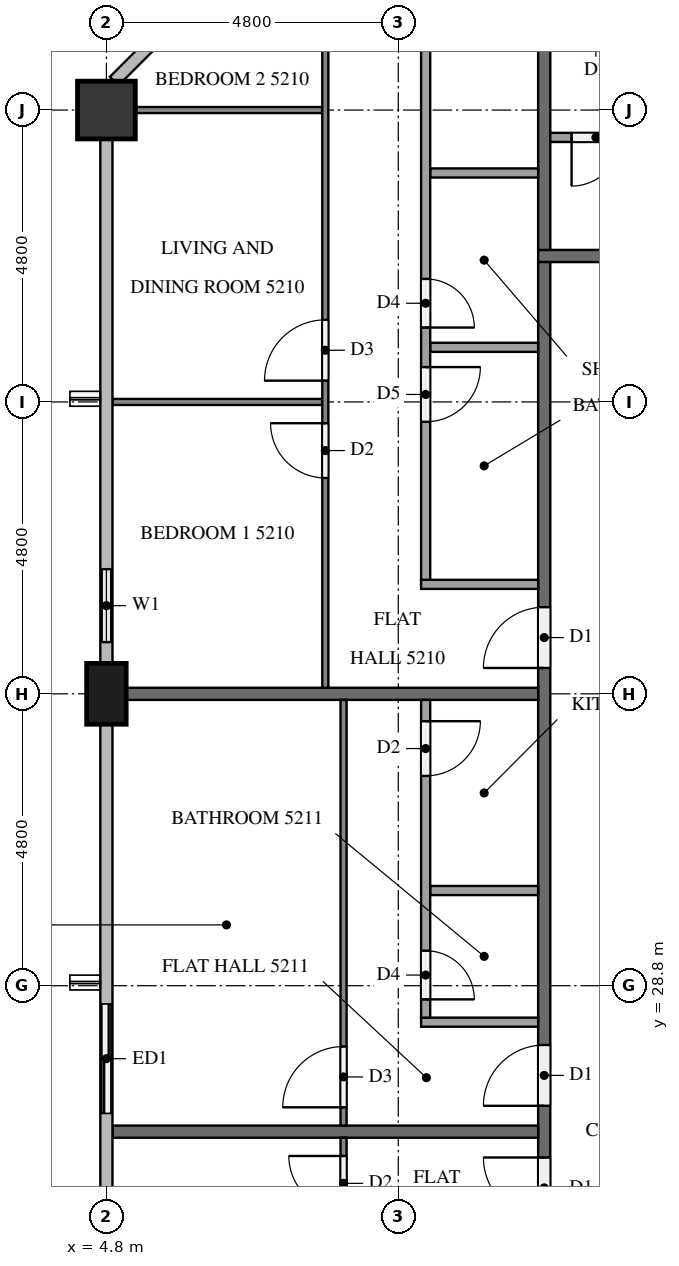
"""IFC4 building model, lengths in metres.
Left out: names, types, materials, properties, quantities, classifications, styles, units other than length and angle.
Written with IfcOpenShell. Run it as: python <this file> out.ifc"""

import sys

from ifc_helpers import new_model, si_unit, direction, frame, frame_2d, origin, origin_2d, place, context, subcontext, project, spatial, rectangle, extrude, element, fill, save


model = new_model("IFC4")
c1 = context("Model", 3, precision=1e-05, world=origin(), true_north=direction((0.0, 1.0)))
c2 = subcontext(c1, "Body", "Model", "MODEL_VIEW")
j1 = project(units=[si_unit("LENGTHUNIT", "METRE"), si_unit("PLANEANGLEUNIT", "RADIAN")], contexts=[c1])
p1 = place(None, origin())
s1 = spatial("IfcSite", under=j1, at=p1, CompositionType="ELEMENT")
p2 = place(p1, origin())
s2 = spatial("IfcBuilding", under=s1, at=p2, CompositionType="ELEMENT")
p3 = place(p2, frame((0.0, 0.0, 199.9)))
s3 = spatial("IfcBuildingStorey", under=s2, at=p3, CompositionType="ELEMENT", Elevation=199.9)
p4 = place(p3, frame((4.8, 43.2, 0.0), z_axis=(0.0, 0.0, 1.0), x_axis=(1.0, 0.0, 0.0)))
e1 = element("IfcColumn", 1, at=p4, inside=s3, PredefinedType="COLUMN", context=c2, shape_type="SweptSolid", body=[
    extrude(rectangle(XDim=0.95, YDim=0.95, at=origin_2d()), origin(), (0.0, 0.0, 1.0), 3.1),
])
p5 = place(p3, frame((4.8, 33.6, 0.0), z_axis=(0.0, 0.0, 1.0), x_axis=(0.0, 1.0, 0.0)))
e2 = element("IfcColumn", 2, at=p5, inside=s3, PredefinedType="COLUMN", context=c2, shape_type="SweptSolid", body=[
    extrude(rectangle(XDim=1.0, YDim=0.65, at=origin_2d()), origin(), (0.0, 0.0, 1.0), 3.1),
])
p6 = place(p3, frame((4.8, 36.0, 0.0), z_axis=(0.0, 0.0, 1.0), x_axis=(0.0, -1.0, 0.0)))
e3 = element("IfcWall", 3, at=p6, inside=s3, PredefinedType="SOLIDWALL", context=c2, shape_type="SweptSolid", body=[
    extrude(rectangle(XDim=1.9, YDim=0.15, at=frame_2d((0.95, 0.0))), origin(), (0.0, 0.0, 1.0), 3.1),
])
p7 = place(p6, frame((0.35, 0.0, 0.9)))
e4 = element("IfcOpeningElement", 4, at=p7, cuts=e3, PredefinedType="OPENING", context=c2, shape_type="SweptSolid", body=[
    extrude(rectangle(XDim=1.2, YDim=1.4, at=frame_2d((0.6, 0.7))), frame((0.0, 0.085, 0.0), z_axis=(0.0, -1.0, 0.0), x_axis=(1.0, 0.0, 0.0)), (0.0, 0.0, 1.0), 0.17),
])
p8 = place(p3, frame((4.8, 28.8, 0.0), z_axis=(0.0, 0.0, 1.0), x_axis=(0.0, -1.0, 0.0)))
e5 = element("IfcWall", 5, at=p8, inside=s3, PredefinedType="SOLIDWALL", context=c2, shape_type="SweptSolid", body=[
    extrude(rectangle(XDim=2.4, YDim=0.15, at=frame_2d((1.2, 0.0))), origin(), (0.0, 0.0, 1.0), 3.1),
])
p9 = place(p8, frame((0.3, 0.0, 0.0)))
e6 = element("IfcOpeningElement", 6, at=p9, cuts=e5, PredefinedType="OPENING", context=c2, shape_type="SweptSolid", body=[
    extrude(rectangle(XDim=1.8, YDim=2.4, at=frame_2d((0.9, 1.2))), frame((0.0, 0.085, 0.0), z_axis=(0.0, -1.0, 0.0), x_axis=(1.0, 0.0, 0.0)), (0.0, 0.0, 1.0), 0.17),
])
p10 = place(p3, frame((11.9, 40.8, 0.0), z_axis=(0.0, 0.0, 1.0), x_axis=(1.0, 0.0, 0.0)))
e7 = element("IfcWall", 7, at=p10, inside=s3, PredefinedType="PARTITIONING", context=c2, shape_type="SweptSolid", body=[
    extrude(rectangle(XDim=38.6, YDim=0.2, at=frame_2d((19.3, 0.0))), origin(), (0.0, 0.0, 1.0), 3.1),
])
p11 = place(p10, frame((37.025, 0.0, 0.0)))
e8 = element("IfcOpeningElement", 8, at=p11, cuts=e7, PredefinedType="OPENING", context=c2, shape_type="SweptSolid", body=[
    extrude(rectangle(XDim=1.1, YDim=2.1, at=frame_2d((0.55, 1.05))), frame((0.0, 0.11, 0.0), z_axis=(0.0, -1.0, 0.0), x_axis=(1.0, 0.0, 0.0)), (0.0, 0.0, 1.0), 0.22),
])
p12 = place(p10, frame((17.825, 0.0, 0.0)))
e9 = element("IfcOpeningElement", 9, at=p12, cuts=e7, PredefinedType="OPENING", context=c2, shape_type="SweptSolid", body=[
    extrude(rectangle(XDim=1.1, YDim=2.1, at=frame_2d((0.55, 1.05))), frame((0.0, 0.11, 0.0), z_axis=(0.0, -1.0, 0.0), x_axis=(1.0, 0.0, 0.0)), (0.0, 0.0, 1.0), 0.22),
])
p13 = place(p3, frame((12.0, 12.1, 0.0), z_axis=(0.0, 0.0, 1.0), x_axis=(0.0, 1.0, 0.0)))
e10 = element("IfcWall", 10, at=p13, inside=s3, PredefinedType="PARTITIONING", context=c2, shape_type="SweptSolid", body=[
    extrude(rectangle(XDim=28.6, YDim=0.2, at=frame_2d((14.3, 0.0))), origin(), (0.0, 0.0, 1.0), 3.1),
])
p14 = place(p13, frame((21.925, 0.0, 0.0)))
e11 = element("IfcOpeningElement", 11, at=p14, cuts=e10, PredefinedType="OPENING", context=c2, shape_type="SweptSolid", body=[
    extrude(rectangle(XDim=1.0, YDim=2.1, at=frame_2d((0.5, 1.05))), frame((0.0, 0.11, 0.0), z_axis=(0.0, -1.0, 0.0), x_axis=(1.0, 0.0, 0.0)), (0.0, 0.0, 1.0), 0.22),
])
p15 = place(p13, frame((14.725, 0.0, 0.0)))
e12 = element("IfcOpeningElement", 12, at=p15, cuts=e10, PredefinedType="OPENING", context=c2, shape_type="SweptSolid", body=[
    extrude(rectangle(XDim=1.0, YDim=2.1, at=frame_2d((0.5, 1.05))), frame((0.0, 0.11, 0.0), z_axis=(0.0, -1.0, 0.0), x_axis=(1.0, 0.0, 0.0)), (0.0, 0.0, 1.0), 0.22),
])
p16 = place(p13, frame((12.875, 0.0, 0.0)))
e13 = element("IfcOpeningElement", 13, at=p16, cuts=e10, PredefinedType="OPENING", context=c2, shape_type="SweptSolid", body=[
    extrude(rectangle(XDim=1.0, YDim=2.1, at=frame_2d((0.5, 1.05))), frame((0.0, 0.11, 0.0), z_axis=(0.0, -1.0, 0.0), x_axis=(1.0, 0.0, 0.0)), (0.0, 0.0, 1.0), 0.22),
])
p17 = place(p3, frame((12.0, 47.9, 0.0), z_axis=(0.0, 0.0, 1.0), x_axis=(0.0, -1.0, 0.0)))
e14 = element("IfcWall", 14, at=p17, inside=s3, PredefinedType="PARTITIONING", context=c2, shape_type="SweptSolid", body=[
    extrude(rectangle(XDim=7.0, YDim=0.2, at=frame_2d((3.5, 0.0))), origin(), (0.0, 0.0, 1.0), 3.1),
])
p18 = place(p3, frame((5.125, 33.6, 0.0), z_axis=(0.0, 0.0, 1.0), x_axis=(1.0, 0.0, 0.0)))
e15 = element("IfcWall", 15, at=p18, inside=s3, PredefinedType="PARTITIONING", context=c2, shape_type="SweptSolid", body=[
    extrude(rectangle(XDim=6.775, YDim=0.2, at=frame_2d((3.387, 0.0))), origin(), (0.0, 0.0, 1.0), 3.1),
])
p19 = place(p3, frame((4.9, 26.4, 0.0), z_axis=(0.0, 0.0, 1.0), x_axis=(1.0, 0.0, 0.0)))
e16 = element("IfcWall", 16, at=p19, inside=s3, PredefinedType="PARTITIONING", context=c2, shape_type="SweptSolid", body=[
    extrude(rectangle(XDim=7.0, YDim=0.2, at=frame_2d((3.5, 0.0))), origin(), (0.0, 0.0, 1.0), 3.1),
])
p20 = place(p3, frame((29.325, 42.75, 0.0), z_axis=(0.0, 0.0, 1.0), x_axis=(-1.0, 0.0, 0.0)))
e17 = element("IfcWall", 17, at=p20, inside=s3, PredefinedType="PARTITIONING", context=c2, shape_type="SweptSolid", body=[
    extrude(rectangle(XDim=17.225, YDim=0.15, at=frame_2d((8.612, 0.0))), origin(), (0.0, 0.0, 1.0), 3.1),
])
p21 = place(p20, frame((0.3, 0.0, 0.0)))
e18 = element("IfcOpeningElement", 18, at=p21, cuts=e17, PredefinedType="OPENING", context=c2, shape_type="SweptSolid", body=[
    extrude(rectangle(XDim=0.9, YDim=2.1, at=frame_2d((0.45, 1.05))), frame((0.0, 0.085, 0.0), z_axis=(0.0, -1.0, 0.0), x_axis=(1.0, 0.0, 0.0)), (0.0, 0.0, 1.0), 0.17),
])
p22 = place(p20, frame((9.541, 0.0, 0.0)))
e19 = element("IfcOpeningElement", 19, at=p22, cuts=e17, PredefinedType="OPENING", context=c2, shape_type="SweptSolid", body=[
    extrude(rectangle(XDim=0.9, YDim=2.1, at=frame_2d((0.45, 1.05))), frame((0.0, 0.085, 0.0), z_axis=(0.0, -1.0, 0.0), x_axis=(1.0, 0.0, 0.0)), (0.0, 0.0, 1.0), 0.17),
])
p23 = place(p20, frame((11.091, 0.0, 0.0)))
e20 = element("IfcOpeningElement", 20, at=p23, cuts=e17, PredefinedType="OPENING", context=c2, shape_type="SweptSolid", body=[
    extrude(rectangle(XDim=0.8, YDim=2.1, at=frame_2d((0.4, 1.05))), frame((0.0, 0.085, 0.0), z_axis=(0.0, -1.0, 0.0), x_axis=(1.0, 0.0, 0.0)), (0.0, 0.0, 1.0), 0.17),
])
p24 = place(p20, frame((16.075, 0.0, 0.0)))
e21 = element("IfcOpeningElement", 21, at=p24, cuts=e17, PredefinedType="OPENING", context=c2, shape_type="SweptSolid", body=[
    extrude(rectangle(XDim=0.8, YDim=2.1, at=frame_2d((0.4, 1.05))), frame((0.0, 0.085, 0.0), z_axis=(0.0, -1.0, 0.0), x_axis=(1.0, 0.0, 0.0)), (0.0, 0.0, 1.0), 0.17),
])
p25 = place(p3, frame((8.35, 38.4, 0.0), z_axis=(0.0, 0.0, 1.0), x_axis=(-1.0, 0.0, 0.0)))
e22 = element("IfcWall", 22, at=p25, inside=s3, PredefinedType="PARTITIONING", context=c2, shape_type="SweptSolid", body=[
    extrude(rectangle(XDim=3.45, YDim=0.1, at=frame_2d((1.725, 0.0))), origin(), (0.0, 0.0, 1.0), 3.1),
])
p26 = place(p3, frame((8.35, 43.2, 0.0), z_axis=(0.0, 0.0, 1.0), x_axis=(-1.0, 0.0, 0.0)))
e23 = element("IfcWall", 23, at=p26, inside=s3, PredefinedType="PARTITIONING", context=c2, shape_type="SweptSolid", body=[
    extrude(rectangle(XDim=3.075, YDim=0.1, at=frame_2d((1.538, 0.0))), origin(), (0.0, 0.0, 1.0), 3.1),
])
p27 = place(p3, frame((8.4, 33.7, 0.0), z_axis=(0.0, 0.0, 1.0), x_axis=(0.0, 1.0, 0.0)))
e24 = element("IfcWall", 24, at=p27, inside=s3, PredefinedType="PARTITIONING", context=c2, shape_type="SweptSolid", body=[
    extrude(rectangle(XDim=13.879, YDim=0.1, at=frame_2d((6.939, 0.0))), origin(), (0.0, 0.0, 1.0), 3.1),
])
p28 = place(p27, frame((3.45, 0.0, 0.0)))
e25 = element("IfcOpeningElement", 25, at=p28, cuts=e24, PredefinedType="OPENING", context=c2, shape_type="SweptSolid", body=[
    extrude(rectangle(XDim=0.9, YDim=2.1, at=frame_2d((0.45, 1.05))), frame((0.0, 0.06, 0.0), z_axis=(0.0, -1.0, 0.0), x_axis=(1.0, 0.0, 0.0)), (0.0, 0.0, 1.0), 0.12),
])
p29 = place(p27, frame((5.05, 0.0, 0.0)))
e26 = element("IfcOpeningElement", 26, at=p29, cuts=e24, PredefinedType="OPENING", context=c2, shape_type="SweptSolid", body=[
    extrude(rectangle(XDim=1.0, YDim=2.1, at=frame_2d((0.5, 1.05))), frame((0.0, 0.06, 0.0), z_axis=(0.0, -1.0, 0.0), x_axis=(1.0, 0.0, 0.0)), (0.0, 0.0, 1.0), 0.12),
])
p30 = place(p27, frame((12.678, 0.0, 0.0)))
e27 = element("IfcOpeningElement", 27, at=p30, cuts=e24, PredefinedType="OPENING", context=c2, shape_type="SweptSolid", body=[
    extrude(rectangle(XDim=0.9, YDim=2.1, at=frame_2d((0.45, 1.05))), frame((0.0, 0.06, 0.0), z_axis=(0.0, -1.0, 0.0), x_axis=(1.0, 0.0, 0.0)), (0.0, 0.0, 1.0), 0.12),
])
for number, where, z_axis, x_axis in (
    (28, (11.9, 39.298, 0.0), (0.0, 0.0, 1.0), (-1.0, 0.0, 0.0)),
    (29, (11.9, 42.165, 0.0), (0.0, 0.0, 1.0), (-1.0, 0.0, 0.0)),
):
    element("IfcWall", number, at=place(p3, frame(where, z_axis=z_axis, x_axis=x_axis)), inside=s3, PredefinedType="PARTITIONING", context=c2, shape_type="SweptSolid", body=[
        extrude(rectangle(XDim=1.775, YDim=0.15, at=frame_2d((0.887, 0.0))), origin(), (0.0, 0.0, 1.0), 3.1),
    ])
p31 = place(p3, frame((11.9, 35.4, 0.0), z_axis=(0.0, 0.0, 1.0), x_axis=(-1.0, 0.0, 0.0)))
e30 = element("IfcWall", 30, at=p31, inside=s3, PredefinedType="PARTITIONING", context=c2, shape_type="SweptSolid", body=[
    extrude(rectangle(XDim=1.925, YDim=0.15, at=frame_2d((0.962, 0.0))), origin(), (0.0, 0.0, 1.0), 3.1),
])
p32 = place(p3, frame((10.05, 47.525, 0.0), z_axis=(0.0, 0.0, 1.0), x_axis=(0.0, -1.0, 0.0)))
e31 = element("IfcWall", 31, at=p32, inside=s3, PredefinedType="PARTITIONING", context=c2, shape_type="SweptSolid", body=[
    extrude(rectangle(XDim=12.05, YDim=0.15, at=frame_2d((6.025, 0.0))), origin(), (0.0, 0.0, 1.0), 3.1),
])
p33 = place(p32, frame((8.552, 0.0, 0.0)))
e32 = element("IfcOpeningElement", 32, at=p33, cuts=e31, PredefinedType="OPENING", context=c2, shape_type="SweptSolid", body=[
    extrude(rectangle(XDim=0.9, YDim=2.1, at=frame_2d((0.45, 1.05))), frame((0.0, 0.085, 0.0), z_axis=(0.0, -1.0, 0.0), x_axis=(1.0, 0.0, 0.0)), (0.0, 0.0, 1.0), 0.17),
])
p34 = place(p32, frame((7.102, 0.0, 0.0)))
e33 = element("IfcOpeningElement", 33, at=p34, cuts=e31, PredefinedType="OPENING", context=c2, shape_type="SweptSolid", body=[
    extrude(rectangle(XDim=0.8, YDim=2.1, at=frame_2d((0.4, 1.05))), frame((0.0, 0.085, 0.0), z_axis=(0.0, -1.0, 0.0), x_axis=(1.0, 0.0, 0.0)), (0.0, 0.0, 1.0), 0.17),
])
p35 = place(p32, frame((0.3, 0.0, 0.0)))
e34 = element("IfcOpeningElement", 34, at=p35, cuts=e31, PredefinedType="OPENING", context=c2, shape_type="SweptSolid", body=[
    extrude(rectangle(XDim=0.9, YDim=2.1, at=frame_2d((0.45, 1.05))), frame((0.0, 0.085, 0.0), z_axis=(0.0, -1.0, 0.0), x_axis=(1.0, 0.0, 0.0)), (0.0, 0.0, 1.0), 0.17),
])
p36 = place(p3, frame((8.7, 26.5, 0.0), z_axis=(0.0, 0.0, 1.0), x_axis=(0.0, 1.0, 0.0)))
e35 = element("IfcWall", 35, at=p36, inside=s3, PredefinedType="PARTITIONING", context=c2, shape_type="SweptSolid", body=[
    extrude(rectangle(XDim=7.0, YDim=0.1, at=frame_2d((3.5, 0.0))), origin(), (0.0, 0.0, 1.0), 3.1),
])
p37 = place(p36, frame((0.3, 0.0, 0.0)))
e36 = element("IfcOpeningElement", 36, at=p37, cuts=e35, PredefinedType="OPENING", context=c2, shape_type="SweptSolid", body=[
    extrude(rectangle(XDim=1.0, YDim=2.1, at=frame_2d((0.5, 1.05))), frame((0.0, 0.06, 0.0), z_axis=(0.0, -1.0, 0.0), x_axis=(1.0, 0.0, 0.0)), (0.0, 0.0, 1.0), 0.12),
])
p38 = place(p3, frame((11.9, 30.365, 0.0), z_axis=(0.0, 0.0, 1.0), x_axis=(-1.0, 0.0, 0.0)))
e37 = element("IfcWall", 37, at=p38, inside=s3, PredefinedType="PARTITIONING", context=c2, shape_type="SweptSolid", body=[
    extrude(rectangle(XDim=1.775, YDim=0.15, at=frame_2d((0.887, 0.0))), origin(), (0.0, 0.0, 1.0), 3.1),
])
p39 = place(p3, frame((11.9, 28.2, 0.0), z_axis=(0.0, 0.0, 1.0), x_axis=(-1.0, 0.0, 0.0)))
e38 = element("IfcWall", 38, at=p39, inside=s3, PredefinedType="PARTITIONING", context=c2, shape_type="SweptSolid", body=[
    extrude(rectangle(XDim=1.925, YDim=0.15, at=frame_2d((0.962, 0.0))), origin(), (0.0, 0.0, 1.0), 3.1),
])
p40 = place(p3, frame((10.05, 33.5, 0.0), z_axis=(0.0, 0.0, 1.0), x_axis=(0.0, -1.0, 0.0)))
e39 = element("IfcWall", 39, at=p40, inside=s3, PredefinedType="PARTITIONING", context=c2, shape_type="SweptSolid", body=[
    extrude(rectangle(XDim=5.225, YDim=0.15, at=frame_2d((2.613, 0.0))), origin(), (0.0, 0.0, 1.0), 3.1),
])
p41 = place(p40, frame((4.125, 0.0, 0.0)))
e40 = element("IfcOpeningElement", 40, at=p41, cuts=e39, PredefinedType="OPENING", context=c2, shape_type="SweptSolid", body=[
    extrude(rectangle(XDim=0.8, YDim=2.1, at=frame_2d((0.4, 1.05))), frame((0.0, 0.085, 0.0), z_axis=(0.0, -1.0, 0.0), x_axis=(1.0, 0.0, 0.0)), (0.0, 0.0, 1.0), 0.17),
])
p42 = place(p40, frame((0.35, 0.0, 0.0)))
e41 = element("IfcOpeningElement", 41, at=p42, cuts=e39, PredefinedType="OPENING", context=c2, shape_type="SweptSolid", body=[
    extrude(rectangle(XDim=0.9, YDim=2.1, at=frame_2d((0.45, 1.05))), frame((0.0, 0.085, 0.0), z_axis=(0.0, -1.0, 0.0), x_axis=(1.0, 0.0, 0.0)), (0.0, 0.0, 1.0), 0.17),
])
p43 = place(p3, frame((8.7, 12.1, 0.0), z_axis=(0.0, 0.0, 1.0), x_axis=(0.0, 1.0, 0.0)))
e42 = element("IfcWall", 42, at=p43, inside=s3, PredefinedType="PARTITIONING", context=c2, shape_type="SweptSolid", body=[
    extrude(rectangle(XDim=14.2, YDim=0.1, at=frame_2d((7.1, 0.0))), origin(), (0.0, 0.0, 1.0), 3.1),
])
p44 = place(p43, frame((13.0, 0.0, 0.0)))
e43 = element("IfcOpeningElement", 43, at=p44, cuts=e42, PredefinedType="OPENING", context=c2, shape_type="SweptSolid", body=[
    extrude(rectangle(XDim=0.9, YDim=2.1, at=frame_2d((0.45, 1.05))), frame((0.0, 0.06, 0.0), z_axis=(0.0, -1.0, 0.0), x_axis=(1.0, 0.0, 0.0)), (0.0, 0.0, 1.0), 0.12),
])
p45 = place(p43, frame((5.05, 0.0, 0.0)))
e44 = element("IfcOpeningElement", 44, at=p45, cuts=e42, PredefinedType="OPENING", context=c2, shape_type="SweptSolid", body=[
    extrude(rectangle(XDim=1.0, YDim=2.1, at=frame_2d((0.5, 1.05))), frame((0.0, 0.06, 0.0), z_axis=(0.0, -1.0, 0.0), x_axis=(1.0, 0.0, 0.0)), (0.0, 0.0, 1.0), 0.12),
])
p46 = place(p43, frame((3.45, 0.0, 0.0)))
e45 = element("IfcOpeningElement", 45, at=p46, cuts=e42, PredefinedType="OPENING", context=c2, shape_type="SweptSolid", body=[
    extrude(rectangle(XDim=0.9, YDim=2.1, at=frame_2d((0.45, 1.05))), frame((0.0, 0.06, 0.0), z_axis=(0.0, -1.0, 0.0), x_axis=(1.0, 0.0, 0.0)), (0.0, 0.0, 1.0), 0.12),
])
p47 = place(p7, origin())
e46 = element("IfcWindow", 46, at=p47, inside=s3, PartitioningType="SINGLE_PANEL", PredefinedType="WINDOW", context=c2, shape_type="SweptSolid", body=[
    extrude(rectangle(XDim=1.2, YDim=1.4, at=frame_2d((0.6, 0.7))), frame((0.0, 0.03, 0.0), z_axis=(0.0, -1.0, 0.0), x_axis=(1.0, 0.0, 0.0)), (0.0, 0.0, 1.0), 0.06),
])
fill(e4, e46)
p48 = place(p9, origin())
e47 = element("IfcDoor", 47, at=p48, inside=s3, OperationType="SLIDING_TO_LEFT", PredefinedType="DOOR", context=c2, shape_type="SweptSolid", body=[
    extrude(rectangle(XDim=1.8, YDim=2.4, at=frame_2d((0.9, 1.2))), frame((0.0, 0.025, 0.0), z_axis=(0.0, -1.0, 0.0), x_axis=(1.0, 0.0, 0.0)), (0.0, 0.0, 1.0), 0.05),
])
fill(e6, e47)
p49 = place(p14, origin())
e48 = element("IfcDoor", 48, at=p49, inside=s3, OperationType="SINGLE_SWING_LEFT", PredefinedType="DOOR", context=c2, shape_type="SweptSolid", body=[
    extrude(rectangle(XDim=1.0, YDim=2.1, at=frame_2d((0.5, 1.05))), frame((0.0, 0.025, 0.0), z_axis=(0.0, -1.0, 0.0), x_axis=(1.0, 0.0, 0.0)), (0.0, 0.0, 1.0), 0.05),
])
fill(e11, e48)
p50 = place(p15, origin())
e49 = element("IfcDoor", 49, at=p50, inside=s3, OperationType="SINGLE_SWING_LEFT", PredefinedType="DOOR", context=c2, shape_type="SweptSolid", body=[
    extrude(rectangle(XDim=1.0, YDim=2.1, at=frame_2d((0.5, 1.05))), frame((0.0, 0.025, 0.0), z_axis=(0.0, -1.0, 0.0), x_axis=(1.0, 0.0, 0.0)), (0.0, 0.0, 1.0), 0.05),
])
fill(e12, e49)
p51 = place(p16, origin())
e50 = element("IfcDoor", 50, at=p51, inside=s3, OperationType="SINGLE_SWING_RIGHT", PredefinedType="DOOR", context=c2, shape_type="SweptSolid", body=[
    extrude(rectangle(XDim=1.0, YDim=2.1, at=frame_2d((0.5, 1.05))), frame((0.0, 0.025, 0.0), z_axis=(0.0, -1.0, 0.0), x_axis=(1.0, 0.0, 0.0)), (0.0, 0.0, 1.0), 0.05),
])
fill(e13, e50)
p52 = place(p24, origin())
e51 = element("IfcDoor", 51, at=p52, inside=s3, OperationType="SINGLE_SWING_RIGHT", PredefinedType="DOOR", context=c2, shape_type="SweptSolid", body=[
    extrude(rectangle(XDim=0.8, YDim=2.1, at=frame_2d((0.4, 1.05))), frame((0.0, 0.025, 0.0), z_axis=(0.0, -1.0, 0.0), x_axis=(1.0, 0.0, 0.0)), (0.0, 0.0, 1.0), 0.05),
])
fill(e21, e51)
p53 = place(p28, origin())
e52 = element("IfcDoor", 52, at=p53, inside=s3, OperationType="SINGLE_SWING_RIGHT", PredefinedType="DOOR", context=c2, shape_type="SweptSolid", body=[
    extrude(rectangle(XDim=0.9, YDim=2.1, at=frame_2d((0.45, 1.05))), frame((0.0, 0.025, 0.0), z_axis=(0.0, -1.0, 0.0), x_axis=(1.0, 0.0, 0.0)), (0.0, 0.0, 1.0), 0.05),
])
fill(e25, e52)
p54 = place(p29, origin())
e53 = element("IfcDoor", 53, at=p54, inside=s3, OperationType="SINGLE_SWING_LEFT", PredefinedType="DOOR", context=c2, shape_type="SweptSolid", body=[
    extrude(rectangle(XDim=1.0, YDim=2.1, at=frame_2d((0.5, 1.05))), frame((0.0, 0.025, 0.0), z_axis=(0.0, -1.0, 0.0), x_axis=(1.0, 0.0, 0.0)), (0.0, 0.0, 1.0), 0.05),
])
fill(e26, e53)
p55 = place(p33, origin())
e54 = element("IfcDoor", 54, at=p55, inside=s3, OperationType="SINGLE_SWING_LEFT", PredefinedType="DOOR", context=c2, shape_type="SweptSolid", body=[
    extrude(rectangle(XDim=0.9, YDim=2.1, at=frame_2d((0.45, 1.05))), frame((0.0, 0.025, 0.0), z_axis=(0.0, -1.0, 0.0), x_axis=(1.0, 0.0, 0.0)), (0.0, 0.0, 1.0), 0.05),
])
fill(e32, e54)
p56 = place(p34, origin())
e55 = element("IfcDoor", 55, at=p56, inside=s3, OperationType="SINGLE_SWING_RIGHT", PredefinedType="DOOR", context=c2, shape_type="SweptSolid", body=[
    extrude(rectangle(XDim=0.8, YDim=2.1, at=frame_2d((0.4, 1.05))), frame((0.0, 0.025, 0.0), z_axis=(0.0, -1.0, 0.0), x_axis=(1.0, 0.0, 0.0)), (0.0, 0.0, 1.0), 0.05),
])
fill(e33, e55)
p57 = place(p37, origin())
e56 = element("IfcDoor", 56, at=p57, inside=s3, OperationType="SINGLE_SWING_LEFT", PredefinedType="DOOR", context=c2, shape_type="SweptSolid", body=[
    extrude(rectangle(XDim=1.0, YDim=2.1, at=frame_2d((0.5, 1.05))), frame((0.0, 0.025, 0.0), z_axis=(0.0, -1.0, 0.0), x_axis=(1.0, 0.0, 0.0)), (0.0, 0.0, 1.0), 0.05),
])
fill(e36, e56)
p58 = place(p41, origin())
e57 = element("IfcDoor", 57, at=p58, inside=s3, OperationType="SINGLE_SWING_RIGHT", PredefinedType="DOOR", context=c2, shape_type="SweptSolid", body=[
    extrude(rectangle(XDim=0.8, YDim=2.1, at=frame_2d((0.4, 1.05))), frame((0.0, 0.025, 0.0), z_axis=(0.0, -1.0, 0.0), x_axis=(1.0, 0.0, 0.0)), (0.0, 0.0, 1.0), 0.05),
])
fill(e40, e57)
p59 = place(p42, origin())
e58 = element("IfcDoor", 58, at=p59, inside=s3, OperationType="SINGLE_SWING_LEFT", PredefinedType="DOOR", context=c2, shape_type="SweptSolid", body=[
    extrude(rectangle(XDim=0.9, YDim=2.1, at=frame_2d((0.45, 1.05))), frame((0.0, 0.025, 0.0), z_axis=(0.0, -1.0, 0.0), x_axis=(1.0, 0.0, 0.0)), (0.0, 0.0, 1.0), 0.05),
])
fill(e41, e58)
p60 = place(p44, origin())
e59 = element("IfcDoor", 59, at=p60, inside=s3, OperationType="SINGLE_SWING_RIGHT", PredefinedType="DOOR", context=c2, shape_type="SweptSolid", body=[
    extrude(rectangle(XDim=0.9, YDim=2.1, at=frame_2d((0.45, 1.05))), frame((0.0, 0.025, 0.0), z_axis=(0.0, -1.0, 0.0), x_axis=(1.0, 0.0, 0.0)), (0.0, 0.0, 1.0), 0.05),
])
fill(e43, e59)
save(model, sys.argv[1])
